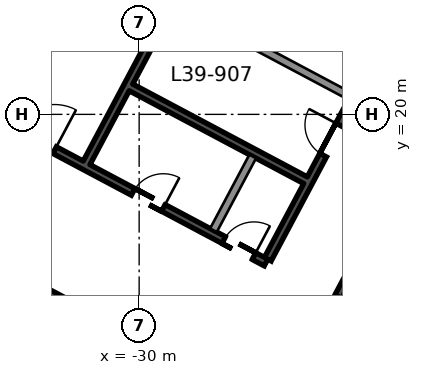
"""IFC4 building model, lengths in metres.
Left out: names, types, materials, properties, quantities, classifications, styles, units other than length and angle.
Written with IfcOpenShell. Run it as: python <this file> out.ifc"""

import sys

from ifc_helpers import new_model, si_unit, direction, frame, frame_2d, origin, place, context, subcontext, project, spatial, rectangle, extrude, element, fill, save


model = new_model("IFC4")
c1 = context("Model", 3, precision=1e-05, world=origin(), true_north=direction((0.0, 1.0)))
c2 = subcontext(c1, "Body", "Model", "MODEL_VIEW")
j1 = project(units=[si_unit("LENGTHUNIT", "METRE"), si_unit("PLANEANGLEUNIT", "RADIAN")], contexts=[c1])
p1 = place(None, origin())
s1 = spatial("IfcSite", under=j1, at=p1, CompositionType="ELEMENT")
p2 = place(p1, origin())
s2 = spatial("IfcBuilding", under=s1, at=p2, CompositionType="ELEMENT")
p3 = place(p2, frame((0.0, 0.0, 183.6)))
s3 = spatial("IfcBuildingStorey", under=s2, at=p3, CompositionType="ELEMENT", Elevation=183.6)
p4 = place(p3, frame((-31.996, 28.168, 0.0), z_axis=(0.0, 0.0, 1.0), x_axis=(-0.469479580143, -0.882943329908, 0.0)))
e1 = element("IfcWall", 1, at=p4, inside=s3, PredefinedType="SHEAR", context=c2, shape_type="SweptSolid", body=[
    extrude(rectangle(XDim=19.7, YDim=0.75, at=frame_2d((9.85, 0.0))), origin(), (0.0, 0.0, 1.0), 6.0),
])
p5 = place(p4, frame((10.45, 0.0, 0.0)))
e2 = element("IfcOpeningElement", 2, at=p5, cuts=e1, PredefinedType="OPENING", context=c2, shape_type="SweptSolid", body=[
    extrude(rectangle(XDim=2.4, YDim=2.4, at=frame_2d((1.2, 1.2))), frame((0.0, 0.385, 0.0), z_axis=(0.0, -1.0, 0.0), x_axis=(1.0, 0.0, 0.0)), (0.0, 0.0, 1.0), 0.77),
])
p6 = place(p3, frame((-14.005, 18.178, 0.0), z_axis=(0.0, 0.0, 1.0), x_axis=(-0.88295010195, 0.469466843842, 0.0)))
e3 = element("IfcWall", 3, at=p6, inside=s3, PredefinedType="SHEAR", context=c2, shape_type="SweptSolid", body=[
    extrude(rectangle(XDim=20.2, YDim=0.75, at=frame_2d((10.1, 0.0))), origin(), (0.0, 0.0, 1.0), 6.0),
])
p7 = place(p3, frame((-21.333, 21.649, 0.0), z_axis=(0.0, 0.0, 1.0), x_axis=(-0.469494272526, -0.882935517501, 0.0)))
e4 = element("IfcWall", 4, at=p7, inside=s3, PredefinedType="SHEAR", context=c2, shape_type="SweptSolid", body=[
    extrude(rectangle(XDim=7.3, YDim=0.2, at=frame_2d((3.65, 0.0))), origin(), (0.0, 0.0, 1.0), 6.0),
])
p8 = place(p7, frame((1.3, 0.0, 0.0)))
e5 = element("IfcOpeningElement", 5, at=p8, cuts=e4, PredefinedType="OPENING", context=c2, shape_type="SweptSolid", body=[
    extrude(rectangle(XDim=1.2, YDim=2.1, at=frame_2d((0.6, 1.05))), frame((0.0, 0.11, 0.0), z_axis=(0.0, -1.0, 0.0), x_axis=(1.0, 0.0, 0.0)), (0.0, 0.0, 1.0), 0.22),
])
p9 = place(p3, frame((-23.188, 22.635, 0.0), z_axis=(0.0, 0.0, 1.0), x_axis=(-0.469454336211, -0.882956752176, 0.0)))
e6 = element("IfcWall", 6, at=p9, inside=s3, PredefinedType="SHEAR", context=c2, shape_type="SweptSolid", body=[
    extrude(rectangle(XDim=7.3, YDim=0.2, at=frame_2d((3.65, 0.0))), origin(), (0.0, 0.0, 1.0), 6.0),
])
p10 = place(p9, frame((0.8, 0.0, 0.0)))
e7 = element("IfcOpeningElement", 7, at=p10, cuts=e6, PredefinedType="OPENING", context=c2, shape_type="SweptSolid", body=[
    extrude(rectangle(XDim=0.9, YDim=2.1, at=frame_2d((0.45, 1.05))), frame((0.0, 0.11, 0.0), z_axis=(0.0, -1.0, 0.0), x_axis=(1.0, 0.0, 0.0)), (0.0, 0.0, 1.0), 0.22),
])
p11 = place(p9, frame((3.3, 0.0, 0.0)))
e8 = element("IfcOpeningElement", 8, at=p11, cuts=e6, PredefinedType="OPENING", context=c2, shape_type="SweptSolid", body=[
    extrude(rectangle(XDim=0.9, YDim=2.1, at=frame_2d((0.45, 1.05))), frame((0.0, 0.11, 0.0), z_axis=(0.0, -1.0, 0.0), x_axis=(1.0, 0.0, 0.0)), (0.0, 0.0, 1.0), 0.22),
])
p12 = place(p3, frame((-27.012, 18.893, 0.0), z_axis=(0.0, 0.0, 1.0), x_axis=(-0.4694473164, -0.882960484464, 0.0)))
e9 = element("IfcWall", 9, at=p12, inside=s3, PredefinedType="SOLIDWALL", context=c2, shape_type="SweptSolid", body=[
    extrude(rectangle(XDim=2.2, YDim=0.2, at=frame_2d((1.1, 0.0))), origin(), (0.0, 0.0, 1.0), 6.0),
])
p13 = place(p3, frame((-27.955, 25.171, 0.0), z_axis=(0.0, 0.0, 1.0), x_axis=(-0.469480409012, -0.88294288918, 0.0)))
e10 = element("IfcWall", 10, at=p13, inside=s3, PredefinedType="SHEAR", context=c2, shape_type="SweptSolid", body=[
    extrude(rectangle(XDim=7.3, YDim=0.2, at=frame_2d((3.65, 0.0))), origin(), (0.0, 0.0, 1.0), 6.0),
])
p14 = place(p3, frame((-24.449, 20.475, 0.0), z_axis=(0.0, 0.0, 1.0), x_axis=(-0.882934506056, 0.469496174655, 0.0)))
e11 = element("IfcWall", 11, at=p14, inside=s3, PredefinedType="SOLIDWALL", context=c2, shape_type="SweptSolid", body=[
    extrude(rectangle(XDim=5.2, YDim=0.2, at=frame_2d((2.6, 0.0))), origin(), (0.0, 0.0, 1.0), 6.0),
])
p15 = place(p3, frame((-25.623, 18.268, 0.0), z_axis=(0.0, 0.0, 1.0), x_axis=(-0.882953967957, 0.469459572775, 0.0)))
e12 = element("IfcWall", 12, at=p15, inside=s3, PredefinedType="SHEAR", context=c2, shape_type="SweptSolid", body=[
    extrude(rectangle(XDim=5.2, YDim=0.2, at=frame_2d((2.6, 0.0))), origin(), (0.0, 0.0, 1.0), 6.0),
])
p16 = place(p3, frame((-26.662, 16.102, 0.0), z_axis=(0.0, 0.0, 1.0), x_axis=(-0.882940221191, 0.469485426614, 0.0)))
e13 = element("IfcWall", 13, at=p16, inside=s3, PredefinedType="SHEAR", context=c2, shape_type="SweptSolid", body=[
    extrude(rectangle(XDim=10.0, YDim=0.2, at=frame_2d((5.0, 0.0))), origin(), (0.0, 0.0, 1.0), 6.0),
])
p17 = place(p16, frame((6.3, 0.0, 0.0)))
e14 = element("IfcOpeningElement", 14, at=p17, cuts=e13, PredefinedType="OPENING", context=c2, shape_type="SweptSolid", body=[
    extrude(rectangle(XDim=1.2, YDim=2.1, at=frame_2d((0.6, 1.05))), frame((0.0, 0.11, 0.0), z_axis=(0.0, -1.0, 0.0), x_axis=(1.0, 0.0, 0.0)), (0.0, 0.0, 1.0), 0.22),
])
p18 = place(p16, frame((0.36, 0.0, 0.0)))
e15 = element("IfcOpeningElement", 15, at=p18, cuts=e13, PredefinedType="OPENING", context=c2, shape_type="SweptSolid", body=[
    extrude(rectangle(XDim=0.9, YDim=2.1, at=frame_2d((0.45, 1.05))), frame((0.0, 0.11, 0.0), z_axis=(0.0, -1.0, 0.0), x_axis=(1.0, 0.0, 0.0)), (0.0, 0.0, 1.0), 0.22),
])
p19 = place(p16, frame((3.06, 0.0, 0.0)))
e16 = element("IfcOpeningElement", 16, at=p19, cuts=e13, PredefinedType="OPENING", context=c2, shape_type="SweptSolid", body=[
    extrude(rectangle(XDim=0.9, YDim=2.1, at=frame_2d((0.45, 1.05))), frame((0.0, 0.11, 0.0), z_axis=(0.0, -1.0, 0.0), x_axis=(1.0, 0.0, 0.0)), (0.0, 0.0, 1.0), 0.22),
])
p20 = place(p3, frame((-29.935, 13.991, 0.0), z_axis=(0.0, 0.0, 1.0), x_axis=(-0.882952937579, 0.469461510692, 0.0)))
e17 = element("IfcWall", 17, at=p20, inside=s3, PredefinedType="SHEAR", context=c2, shape_type="SweptSolid", body=[
    extrude(rectangle(XDim=5.4, YDim=0.2, at=frame_2d((2.7, 0.0))), origin(), (0.0, 0.0, 1.0), 6.0),
])
p21 = place(p20, frame((0.8, 0.0, 0.0)))
e18 = element("IfcOpeningElement", 18, at=p21, cuts=e17, PredefinedType="OPENING", context=c2, shape_type="SweptSolid", body=[
    extrude(rectangle(XDim=1.1, YDim=2.1, at=frame_2d((0.55, 1.05))), frame((0.0, 0.11, 0.0), z_axis=(0.0, -1.0, 0.0), x_axis=(1.0, 0.0, 0.0)), (0.0, 0.0, 1.0), 0.22),
])
p22 = place(p20, frame((3.5, 0.0, 0.0)))
e19 = element("IfcOpeningElement", 19, at=p22, cuts=e17, PredefinedType="OPENING", context=c2, shape_type="SweptSolid", body=[
    extrude(rectangle(XDim=1.1, YDim=2.1, at=frame_2d((0.55, 1.05))), frame((0.0, 0.11, 0.0), z_axis=(0.0, -1.0, 0.0), x_axis=(1.0, 0.0, 0.0)), (0.0, 0.0, 1.0), 0.22),
])
p23 = place(p3, frame((-31.15, 11.919, 0.0), z_axis=(0.0, 0.0, 1.0), x_axis=(-0.882940221191, 0.469485426614, 0.0)))
e20 = element("IfcWall", 20, at=p23, inside=s3, PredefinedType="SHEAR", context=c2, shape_type="SweptSolid", body=[
    extrude(rectangle(XDim=8.0, YDim=0.2, at=frame_2d((4.0, 0.0))), origin(), (0.0, 0.0, 1.0), 6.0),
])
p24 = place(p3, frame((-47.73, 40.102, 0.0), z_axis=(0.0, 0.0, 1.0), x_axis=(0.882942458257, -0.469481219441, 0.0)))
e21 = element("IfcWall", 21, at=p24, inside=s3, PredefinedType="PARTITIONING", context=c2, shape_type="SweptSolid", body=[
    extrude(rectangle(XDim=54.058, YDim=0.2, at=frame_2d((27.029, 0.0))), origin(), (0.0, 0.0, 1.0), 5.55),
])
p25 = place(p24, frame((38.665, 0.0, 0.0)))
e22 = element("IfcOpeningElement", 22, at=p25, cuts=e21, PredefinedType="OPENING", context=c2, shape_type="SweptSolid", body=[
    extrude(rectangle(XDim=1.0, YDim=2.1, at=frame_2d((0.5, 1.05))), frame((0.0, 0.11, 0.0), z_axis=(0.0, -1.0, 0.0), x_axis=(1.0, 0.0, 0.0)), (0.0, 0.0, 1.0), 0.22),
])
p26 = place(p24, frame((26.766, 0.0, 0.0)))
e23 = element("IfcOpeningElement", 23, at=p26, cuts=e21, PredefinedType="OPENING", context=c2, shape_type="SweptSolid", body=[
    extrude(rectangle(XDim=1.0, YDim=2.1, at=frame_2d((0.5, 1.05))), frame((0.0, 0.11, 0.0), z_axis=(0.0, -1.0, 0.0), x_axis=(1.0, 0.0, 0.0)), (0.0, 0.0, 1.0), 0.22),
])
p27 = place(p24, frame((20.465, 0.0, 0.0)))
e24 = element("IfcOpeningElement", 24, at=p27, cuts=e21, PredefinedType="OPENING", context=c2, shape_type="SweptSolid", body=[
    extrude(rectangle(XDim=1.0, YDim=2.1, at=frame_2d((0.5, 1.05))), frame((0.0, 0.11, 0.0), z_axis=(0.0, -1.0, 0.0), x_axis=(1.0, 0.0, 0.0)), (0.0, 0.0, 1.0), 0.22),
])
p28 = place(p24, frame((14.866, 0.0, 0.0)))
e25 = element("IfcOpeningElement", 25, at=p28, cuts=e21, PredefinedType="OPENING", context=c2, shape_type="SweptSolid", body=[
    extrude(rectangle(XDim=1.0, YDim=2.1, at=frame_2d((0.5, 1.05))), frame((0.0, 0.11, 0.0), z_axis=(0.0, -1.0, 0.0), x_axis=(1.0, 0.0, 0.0)), (0.0, 0.0, 1.0), 0.22),
])
p29 = place(p17, frame((1.2, 0.0, 0.0), z_axis=(0.0, 0.0, 1.0), x_axis=(-1.0, 0.0, 0.0)))
e26 = element("IfcDoor", 26, at=p29, inside=s3, OperationType="SINGLE_SWING_RIGHT", PredefinedType="DOOR", context=c2, shape_type="SweptSolid", body=[
    extrude(rectangle(XDim=1.2, YDim=2.1, at=frame_2d((0.6, 1.05))), frame((0.0, 0.025, 0.0), z_axis=(0.0, -1.0, 0.0), x_axis=(1.0, 0.0, 0.0)), (0.0, 0.0, 1.0), 0.05),
])
fill(e14, e26)
p30 = place(p18, frame((0.9, 0.0, 0.0), z_axis=(0.0, 0.0, 1.0), x_axis=(-1.0, 0.0, 0.0)))
e27 = element("IfcDoor", 27, at=p30, inside=s3, OperationType="SINGLE_SWING_RIGHT", PredefinedType="DOOR", context=c2, shape_type="SweptSolid", body=[
    extrude(rectangle(XDim=0.9, YDim=2.1, at=frame_2d((0.45, 1.05))), frame((0.0, 0.025, 0.0), z_axis=(0.0, -1.0, 0.0), x_axis=(1.0, 0.0, 0.0)), (0.0, 0.0, 1.0), 0.05),
])
fill(e15, e27)
p31 = place(p19, frame((0.9, 0.0, 0.0), z_axis=(0.0, 0.0, 1.0), x_axis=(-1.0, 0.0, 0.0)))
e28 = element("IfcDoor", 28, at=p31, inside=s3, OperationType="SINGLE_SWING_RIGHT", PredefinedType="DOOR", context=c2, shape_type="SweptSolid", body=[
    extrude(rectangle(XDim=0.9, YDim=2.1, at=frame_2d((0.45, 1.05))), frame((0.0, 0.025, 0.0), z_axis=(0.0, -1.0, 0.0), x_axis=(1.0, 0.0, 0.0)), (0.0, 0.0, 1.0), 0.05),
])
fill(e16, e28)
p32 = place(p11, frame((0.9, 0.0, 0.0), z_axis=(0.0, 0.0, 1.0), x_axis=(-1.0, 0.0, 0.0)))
e29 = element("IfcDoor", 29, at=p32, inside=s3, OperationType="SINGLE_SWING_RIGHT", PredefinedType="DOOR", context=c2, shape_type="SweptSolid", body=[
    extrude(rectangle(XDim=0.9, YDim=2.1, at=frame_2d((0.45, 1.05))), frame((0.0, 0.025, 0.0), z_axis=(0.0, -1.0, 0.0), x_axis=(1.0, 0.0, 0.0)), (0.0, 0.0, 1.0), 0.05),
])
fill(e8, e29)
save(model, sys.argv[1])
